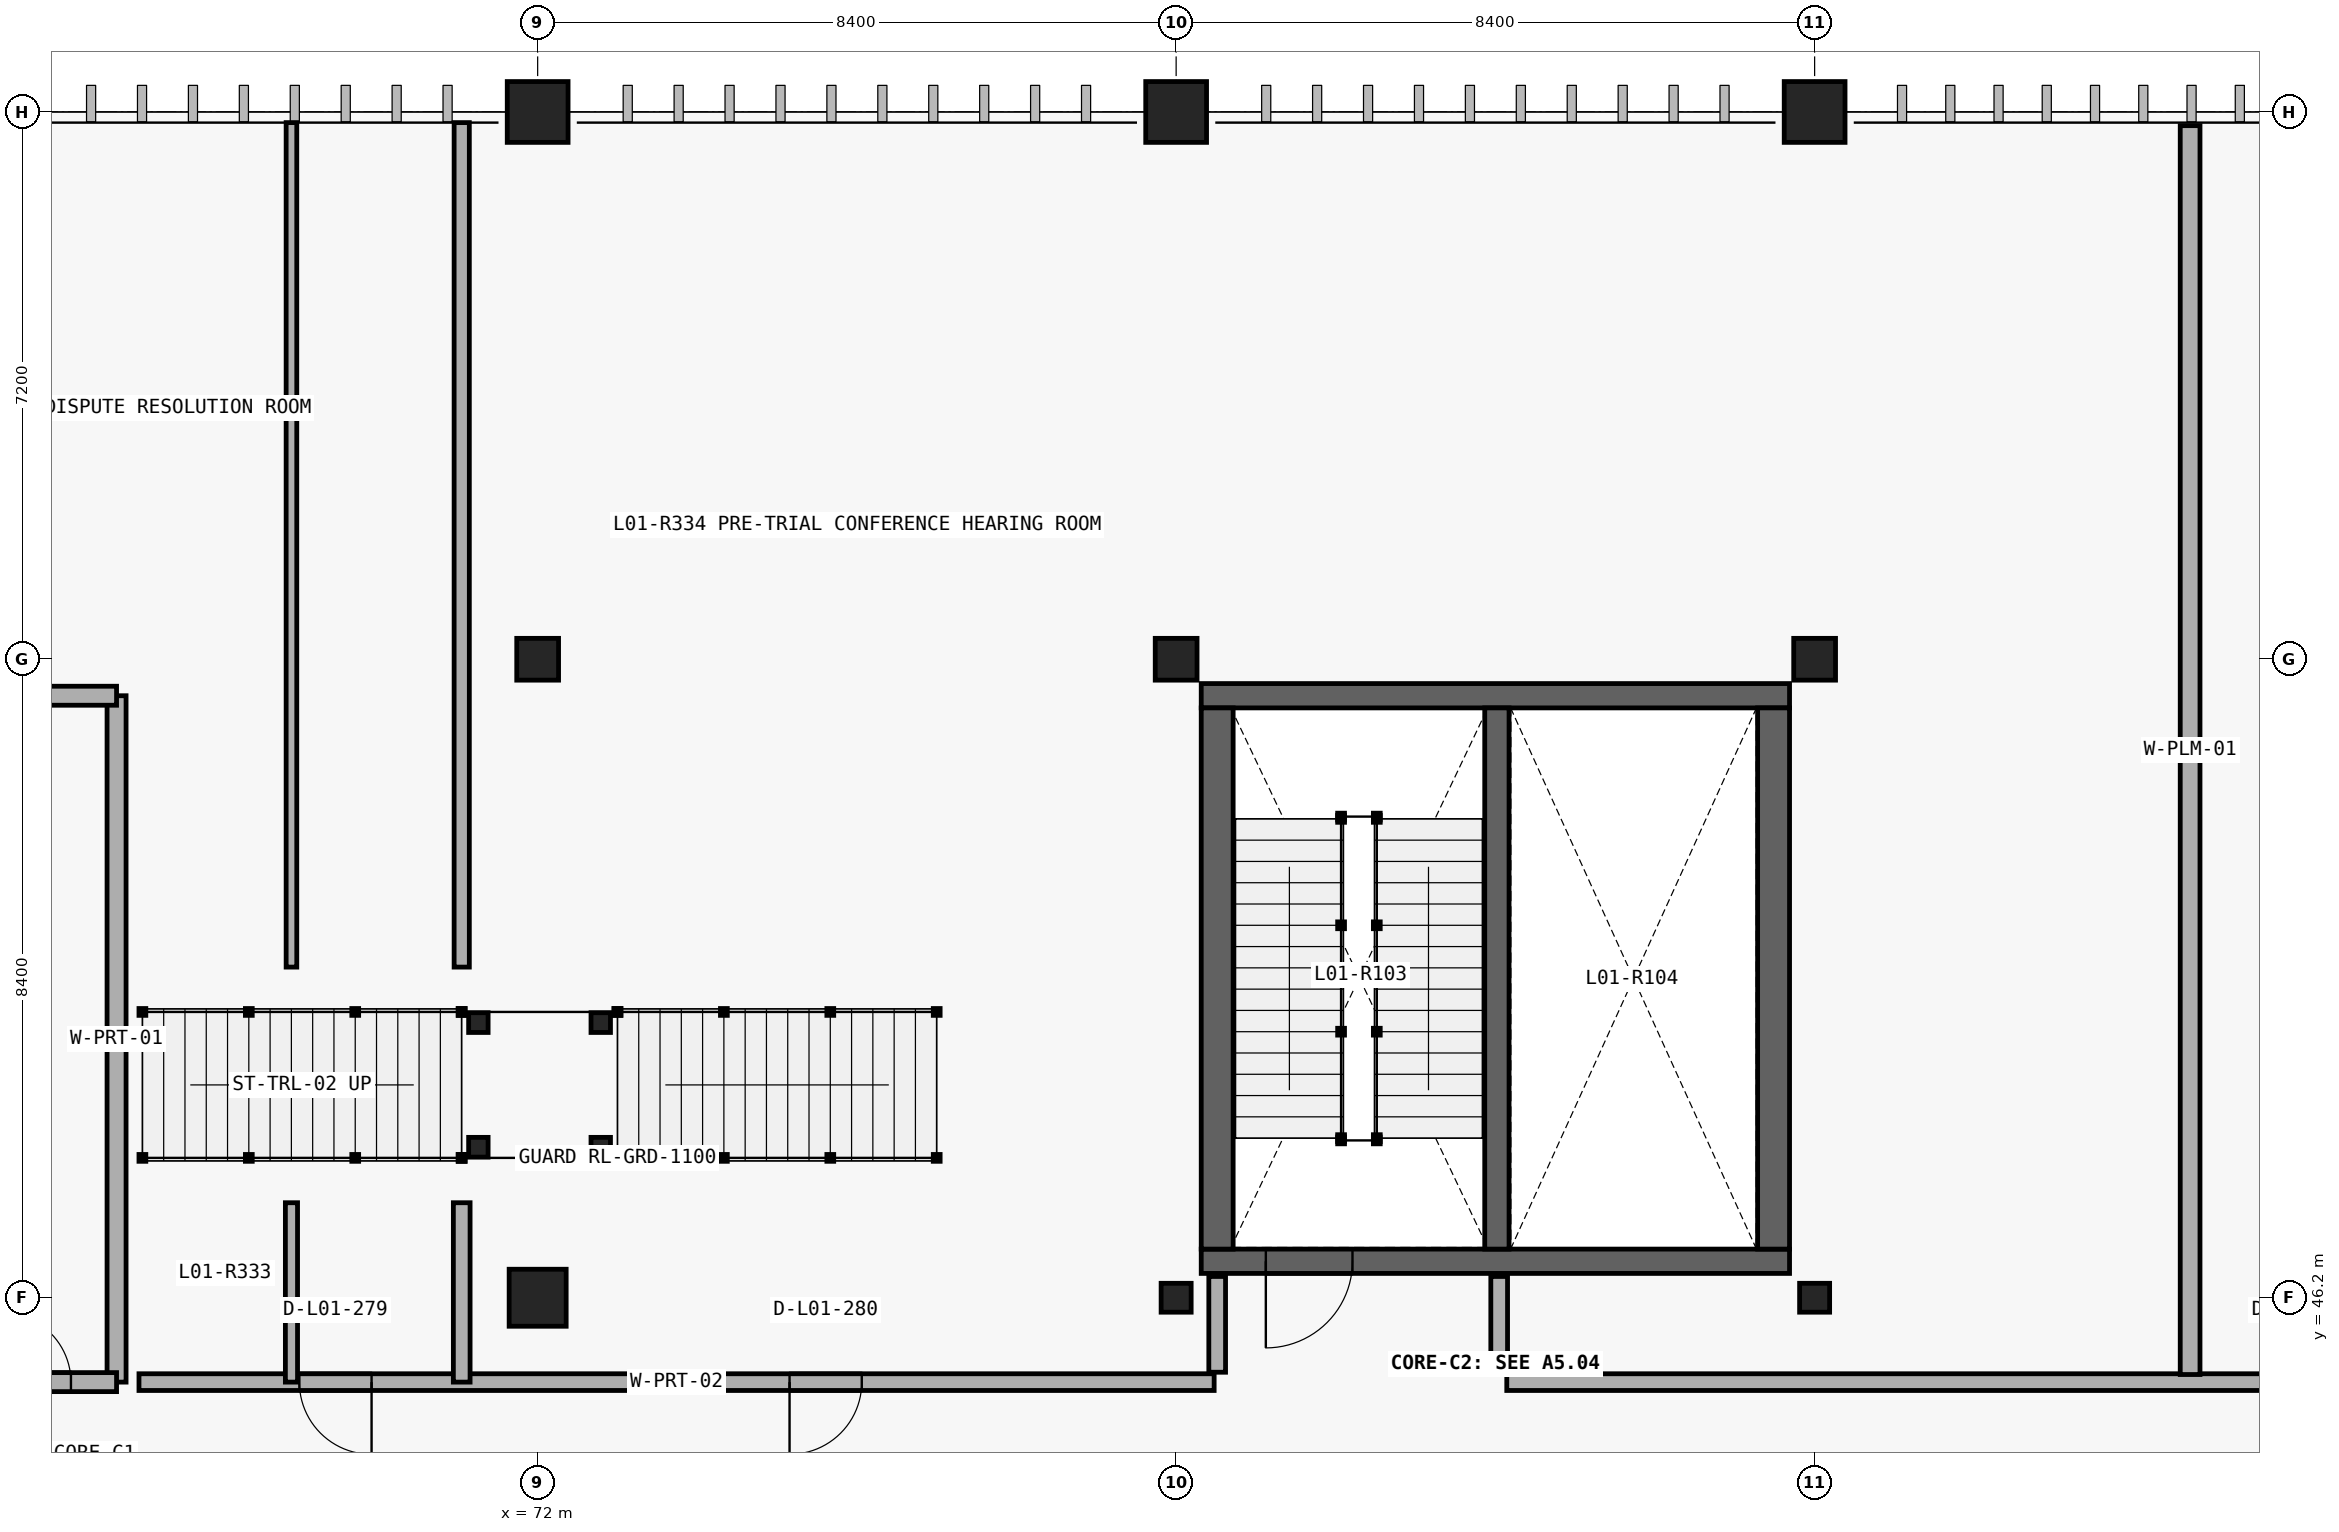
"""IFC4 building model, lengths in metres.
Left out: names, types, materials, properties, quantities, classifications, styles, units other than length and angle.
Written with IfcOpenShell. Run it as: python <this file> out.ifc"""

import sys

from ifc_helpers import new_model, si_unit, direction, frame, frame_2d, origin_with_axes, origin_2d_with_axis, place, context, subcontext, project, spatial, rectangle, circle, i_section, extrude, element, fill, save


model = new_model("IFC4")
c1 = context("Model", 3, precision=1e-05, world=origin_with_axes(), true_north=direction((0.0, 1.0)))
c2 = subcontext(c1, "Body", "Model", "MODEL_VIEW")
j1 = project(units=[si_unit("LENGTHUNIT", "METRE"), si_unit("PLANEANGLEUNIT", "RADIAN")], contexts=[c1])
p1 = place(None, origin_with_axes())
s1 = spatial("IfcSite", under=j1, at=p1, CompositionType="ELEMENT")
p2 = place(p1, origin_with_axes())
s2 = spatial("IfcBuilding", under=s1, at=p2, CompositionType="ELEMENT")
p3 = place(p2, frame((0.0, 0.0, 5.4), z_axis=(0.0, 0.0, 1.0), x_axis=(1.0, 0.0, 0.0)))
s3 = spatial("IfcBuildingStorey", under=s2, at=p3, CompositionType="ELEMENT", Elevation=5.4)
p4 = place(None, frame((66.46, 45.09, 5.4), z_axis=(0.0, 0.0, 1.0), x_axis=(0.0, 1.0, 0.0)))
e1 = element("IfcWall", 1, at=p4, inside=s3, PredefinedType="PARTITIONING", context=c2, shape_type="SweptSolid", body=[
    extrude(rectangle(XDim=9.03, YDim=0.25, at=frame_2d((4.515, 0.0), x_axis=(1.0, 0.0))), origin_with_axes(), (0.0, 0.0, 1.0), 5.08),
])
p5 = place(None, frame((63.1, 54.12, 5.4), z_axis=(0.0, 0.0, 1.0), x_axis=(1.0, 0.0, 0.0)))
e2 = element("IfcWall", 2, at=p5, inside=s3, PredefinedType="PARTITIONING", context=c2, shape_type="SweptSolid", body=[
    extrude(rectangle(XDim=3.36, YDim=0.25, at=frame_2d((1.68, 0.0), x_axis=(1.0, 0.0))), origin_with_axes(), (0.0, 0.0, 1.0), 5.08),
])
p6 = place(None, frame((63.1, 45.09, 5.4), z_axis=(0.0, 0.0, 1.0), x_axis=(1.0, 0.0, 0.0)))
e3 = element("IfcWall", 3, at=p6, inside=s3, PredefinedType="PARTITIONING", context=c2, shape_type="SweptSolid", body=[
    extrude(rectangle(XDim=3.36, YDim=0.25, at=frame_2d((1.68, 0.0), x_axis=(1.0, 0.0))), origin_with_axes(), (0.0, 0.0, 1.0), 5.08),
])
p7 = place(None, frame((65.405, 45.09, 5.4), z_axis=(0.0, 0.0, 1.0), x_axis=(1.0, 0.0, 0.0)))
e4 = element("IfcOpeningElement", 4, at=p7, cuts=e3, PredefinedType="OPENING", context=c2, shape_type="SweptSolid", body=[
    extrude(rectangle(XDim=0.91, YDim=2.12, at=frame_2d((0.0, 1.06), x_axis=(1.0, 0.0))), frame((0.0, 0.135, 0.0), z_axis=(0.0, -1.0, 0.0), x_axis=(1.0, 0.0, 0.0)), (0.0, 0.0, 1.0), 0.27),
])
p8 = place(None, frame((80.73, 46.68, 5.4), z_axis=(0.0, 0.0, 1.0), x_axis=(1.0, 0.0, 0.0)))
e5 = element("IfcWall", 5, at=p8, inside=s3, PredefinedType="SHEAR", context=c2, shape_type="SweptSolid", body=[
    extrude(rectangle(XDim=7.74, YDim=0.32, at=frame_2d((3.87, 0.0), x_axis=(1.0, 0.0))), origin_with_axes(), (0.0, 0.0, 1.0), 5.4),
])
p9 = place(None, frame((82.15, 46.68, 5.4), z_axis=(0.0, 0.0, 1.0), x_axis=(1.0, 0.0, 0.0)))
e6 = element("IfcOpeningElement", 6, at=p9, cuts=e5, PredefinedType="OPENING", context=c2, shape_type="SweptSolid", body=[
    extrude(rectangle(XDim=1.14, YDim=2.18, at=frame_2d((0.0, 1.09), x_axis=(1.0, 0.0))), frame((0.0, 0.17, 0.0), z_axis=(0.0, -1.0, 0.0), x_axis=(1.0, 0.0, 0.0)), (0.0, 0.0, 1.0), 0.34),
])
p10 = place(None, frame((88.47, 54.12, 5.4), z_axis=(0.0, 0.0, 1.0), x_axis=(-1.0, 0.0, 0.0)))
e7 = element("IfcWall", 7, at=p10, inside=s3, PredefinedType="SHEAR", context=c2, shape_type="SweptSolid", body=[
    extrude(rectangle(XDim=7.74, YDim=0.32, at=frame_2d((3.87, 0.0), x_axis=(1.0, 0.0))), origin_with_axes(), (0.0, 0.0, 1.0), 5.4),
])
for number, where, z_axis, x_axis in (
    (8, (88.26, 46.84, 5.4), (0.0, 0.0, 1.0), (0.0, 1.0, 0.0)),
    (9, (80.94, 53.96, 5.4), (0.0, 0.0, 1.0), (0.0, -1.0, 0.0)),
):
    element("IfcWall", number, at=place(None, frame(where, z_axis=z_axis, x_axis=x_axis)), inside=s3, PredefinedType="SHEAR", context=c2, shape_type="SweptSolid", body=[
        extrude(rectangle(XDim=7.12, YDim=0.42, at=frame_2d((3.56, 0.0), x_axis=(1.0, 0.0))), origin_with_axes(), (0.0, 0.0, 1.0), 5.4),
    ])
p11 = place(None, frame((84.62, 46.84, 5.4), z_axis=(0.0, 0.0, 1.0), x_axis=(0.0, 1.0, 0.0)))
e10 = element("IfcWall", 10, at=p11, inside=s3, PredefinedType="SHEAR", context=c2, shape_type="SweptSolid", body=[
    extrude(rectangle(XDim=7.12, YDim=0.32, at=frame_2d((3.56, 0.0), x_axis=(1.0, 0.0))), origin_with_axes(), (0.0, 0.0, 1.0), 5.4),
])
for number, where, z_axis, x_axis in (
    (11, (80.94, 45.22, 5.4), (0.0, 0.0, 1.0), (0.0, 1.0, 0.0)),
    (12, (84.65, 45.22, 5.4), (0.0, 0.0, 1.0), (0.0, 1.0, 0.0)),
):
    element("IfcWall", number, at=place(None, frame(where, z_axis=z_axis, x_axis=x_axis)), inside=s3, PredefinedType="PARTITIONING", context=c2, shape_type="SweptSolid", body=[
        extrude(rectangle(XDim=1.26, YDim=0.22, at=frame_2d((0.63, 0.0), x_axis=(1.0, 0.0))), origin_with_axes(), (0.0, 0.0, 1.0), 5.08),
    ])
p12 = place(None, frame((66.755, 45.09, 5.4), z_axis=(0.0, 0.0, 1.0), x_axis=(1.0, 0.0, 0.0)))
e13 = element("IfcWall", 13, at=p12, inside=s3, PredefinedType="PARTITIONING", context=c2, shape_type="SweptSolid", body=[
    extrude(rectangle(XDim=14.145, YDim=0.22, at=frame_2d((7.072, 0.0), x_axis=(1.0, 0.0))), origin_with_axes(), (0.0, 0.0, 1.0), 5.08),
])
p13 = place(None, frame((69.34, 45.09, 5.4), z_axis=(0.0, 0.0, 1.0), x_axis=(1.0, 0.0, 0.0)))
e14 = element("IfcOpeningElement", 14, at=p13, cuts=e13, PredefinedType="OPENING", context=c2, shape_type="SweptSolid", body=[
    extrude(rectangle(XDim=0.95, YDim=2.16, at=frame_2d((0.0, 1.08), x_axis=(1.0, 0.0))), frame((0.0, 0.12, 0.0), z_axis=(0.0, -1.0, 0.0), x_axis=(1.0, 0.0, 0.0)), (0.0, 0.0, 1.0), 0.24),
])
p14 = place(None, frame((75.789, 45.09, 5.4), z_axis=(0.0, 0.0, 1.0), x_axis=(1.0, 0.0, 0.0)))
e15 = element("IfcOpeningElement", 15, at=p14, cuts=e13, PredefinedType="OPENING", context=c2, shape_type="SweptSolid", body=[
    extrude(rectangle(XDim=0.95, YDim=2.16, at=frame_2d((0.0, 1.08), x_axis=(1.0, 0.0))), frame((0.0, 0.12, 0.0), z_axis=(0.0, -1.0, 0.0), x_axis=(1.0, 0.0, 0.0)), (0.0, 0.0, 1.0), 0.24),
])
p15 = place(None, frame((84.75, 45.09, 5.4), z_axis=(0.0, 0.0, 1.0), x_axis=(1.0, 0.0, 0.0)))
e16 = element("IfcWall", 16, at=p15, inside=s3, PredefinedType="PARTITIONING", context=c2, shape_type="SweptSolid", body=[
    extrude(rectangle(XDim=12.31, YDim=0.22, at=frame_2d((6.155, 0.0), x_axis=(1.0, 0.0))), origin_with_axes(), (0.0, 0.0, 1.0), 5.08),
])
p16 = place(None, frame((95.238, 45.09, 5.4), z_axis=(0.0, 0.0, 1.0), x_axis=(1.0, 0.0, 0.0)))
e17 = element("IfcOpeningElement", 17, at=p16, cuts=e16, PredefinedType="OPENING", context=c2, shape_type="SweptSolid", body=[
    extrude(rectangle(XDim=0.91, YDim=2.12, at=frame_2d((0.0, 1.06), x_axis=(1.0, 0.0))), frame((0.0, 0.12, 0.0), z_axis=(0.0, -1.0, 0.0), x_axis=(1.0, 0.0, 0.0)), (0.0, 0.0, 1.0), 0.24),
])
p17 = place(None, frame((93.74, 45.19, 5.4), z_axis=(0.0, 0.0, 1.0), x_axis=(0.0, 1.0, 0.0)))
e18 = element("IfcWall", 18, at=p17, inside=s3, PredefinedType="PLUMBINGWALL", context=c2, shape_type="SweptSolid", body=[
    extrude(rectangle(XDim=16.43, YDim=0.26, at=frame_2d((8.215, 0.0), x_axis=(1.0, 0.0))), origin_with_axes(), (0.0, 0.0, 1.0), 5.08),
])
p18 = place(None, frame((68.761, 45.09, 5.4), z_axis=(0.0, 0.0, 1.0), x_axis=(0.0, 1.0, 0.0)))
e19 = element("IfcWall", 19, at=p18, inside=s3, PredefinedType="PARTITIONING", context=c2, shape_type="SweptSolid", body=[
    extrude(rectangle(XDim=2.36, YDim=0.16, at=frame_2d((1.18, 0.0), x_axis=(1.0, 0.0))), origin_with_axes(), (0.0, 0.0, 1.0), 5.08),
])
p19 = place(None, frame((68.761, 50.55, 5.4), z_axis=(0.0, 0.0, 1.0), x_axis=(0.0, 1.0, 0.0)))
e20 = element("IfcWall", 20, at=p19, inside=s3, PredefinedType="PARTITIONING", context=c2, shape_type="SweptSolid", body=[
    extrude(rectangle(XDim=11.11, YDim=0.14, at=frame_2d((5.555, 0.0), x_axis=(1.0, 0.0))), origin_with_axes(), (0.0, 0.0, 1.0), 5.08),
])
p20 = place(None, frame((71.001, 45.09, 5.4), z_axis=(0.0, 0.0, 1.0), x_axis=(0.0, 1.0, 0.0)))
e21 = element("IfcWall", 21, at=p20, inside=s3, PredefinedType="PARTITIONING", context=c2, shape_type="SweptSolid", body=[
    extrude(rectangle(XDim=2.36, YDim=0.22, at=frame_2d((1.18, 0.0), x_axis=(1.0, 0.0))), origin_with_axes(), (0.0, 0.0, 1.0), 5.08),
])
p21 = place(None, frame((71.001, 50.55, 5.4), z_axis=(0.0, 0.0, 1.0), x_axis=(0.0, 1.0, 0.0)))
e22 = element("IfcWall", 22, at=p21, inside=s3, PredefinedType="PARTITIONING", context=c2, shape_type="SweptSolid", body=[
    extrude(rectangle(XDim=11.11, YDim=0.2, at=frame_2d((5.555, 0.0), x_axis=(1.0, 0.0))), origin_with_axes(), (0.0, 0.0, 1.0), 5.08),
])
p22 = place(None, frame((72.0, 46.2, 5.4), z_axis=(0.0, 0.0, 1.0), x_axis=(1.0, 0.0, 0.0)))
e23 = element("IfcColumn", 23, at=p22, inside=s3, PredefinedType="COLUMN", context=c2, shape_type="SweptSolid", body=[
    extrude(rectangle(XDim=0.75, YDim=0.75, at=origin_2d_with_axis()), origin_with_axes(), (0.0, 0.0, 1.0), 5.4),
])
p23 = place(None, frame((72.0, 54.6, 5.4), z_axis=(0.0, 0.0, 1.0), x_axis=(1.0, 0.0, 0.0)))
e24 = element("IfcColumn", 24, at=p23, inside=s3, PredefinedType="COLUMN", context=c2, shape_type="SweptSolid", body=[
    extrude(i_section(OverallWidth=0.55, OverallDepth=0.55, WebThickness=0.025, FlangeThickness=0.042, at=origin_2d_with_axis()), origin_with_axes(), (0.0, 0.0, 1.0), 5.4),
])
p24 = place(None, frame((72.0, 61.8, 5.4), z_axis=(0.0, 0.0, 1.0), x_axis=(1.0, 0.0, 0.0)))
e25 = element("IfcColumn", 25, at=p24, inside=s3, PredefinedType="COLUMN", context=c2, shape_type="SweptSolid", body=[
    extrude(circle(Radius=0.4, at=origin_2d_with_axis()), origin_with_axes(), (0.0, 0.0, 1.0), 5.4),
])
p25 = place(None, frame((80.4, 46.2, 5.4), z_axis=(0.0, 0.0, 1.0), x_axis=(1.0, 0.0, 0.0)))
e26 = element("IfcColumn", 26, at=p25, inside=s3, PredefinedType="COLUMN", context=c2, shape_type="SweptSolid", body=[
    extrude(i_section(OverallWidth=0.395, OverallDepth=0.38, WebThickness=0.019, FlangeThickness=0.03, at=origin_2d_with_axis()), origin_with_axes(), (0.0, 0.0, 1.0), 5.4),
])
p26 = place(None, frame((80.4, 54.6, 5.4), z_axis=(0.0, 0.0, 1.0), x_axis=(1.0, 0.0, 0.0)))
e27 = element("IfcColumn", 27, at=p26, inside=s3, PredefinedType="COLUMN", context=c2, shape_type="SweptSolid", body=[
    extrude(i_section(OverallWidth=0.55, OverallDepth=0.55, WebThickness=0.025, FlangeThickness=0.042, at=origin_2d_with_axis()), origin_with_axes(), (0.0, 0.0, 1.0), 5.4),
])
p27 = place(None, frame((80.4, 61.8, 5.4), z_axis=(0.0, 0.0, 1.0), x_axis=(1.0, 0.0, 0.0)))
e28 = element("IfcColumn", 28, at=p27, inside=s3, PredefinedType="COLUMN", context=c2, shape_type="SweptSolid", body=[
    extrude(circle(Radius=0.4, at=origin_2d_with_axis()), origin_with_axes(), (0.0, 0.0, 1.0), 5.4),
])
p28 = place(None, frame((88.8, 46.2, 5.4), z_axis=(0.0, 0.0, 1.0), x_axis=(1.0, 0.0, 0.0)))
e29 = element("IfcColumn", 29, at=p28, inside=s3, PredefinedType="COLUMN", context=c2, shape_type="SweptSolid", body=[
    extrude(i_section(OverallWidth=0.395, OverallDepth=0.38, WebThickness=0.019, FlangeThickness=0.03, at=origin_2d_with_axis()), origin_with_axes(), (0.0, 0.0, 1.0), 5.4),
])
p29 = place(None, frame((88.8, 54.6, 5.4), z_axis=(0.0, 0.0, 1.0), x_axis=(1.0, 0.0, 0.0)))
e30 = element("IfcColumn", 30, at=p29, inside=s3, PredefinedType="COLUMN", context=c2, shape_type="SweptSolid", body=[
    extrude(i_section(OverallWidth=0.55, OverallDepth=0.55, WebThickness=0.025, FlangeThickness=0.042, at=origin_2d_with_axis()), origin_with_axes(), (0.0, 0.0, 1.0), 5.4),
])
p30 = place(None, frame((88.8, 61.8, 5.4), z_axis=(0.0, 0.0, 1.0), x_axis=(1.0, 0.0, 0.0)))
e31 = element("IfcColumn", 31, at=p30, inside=s3, PredefinedType="COLUMN", context=c2, shape_type="SweptSolid", body=[
    extrude(circle(Radius=0.4, at=origin_2d_with_axis()), origin_with_axes(), (0.0, 0.0, 1.0), 5.4),
])
for number, where, z_axis, x_axis in (
    (32, (71.22, 48.18, 5.16), (0.0, 0.0, 1.0), (1.0, 0.0, 0.0)),
    (33, (71.22, 49.82, 5.16), (0.0, 0.0, 1.0), (1.0, 0.0, 0.0)),
    (34, (72.83, 48.18, 5.16), (0.0, 0.0, 1.0), (1.0, 0.0, 0.0)),
    (35, (72.83, 49.82, 5.16), (0.0, 0.0, 1.0), (1.0, 0.0, 0.0)),
):
    element("IfcColumn", number, at=place(None, frame(where, z_axis=z_axis, x_axis=x_axis)), inside=s3, PredefinedType="COLUMN", context=c2, shape_type="SweptSolid", body=[
        extrude(i_section(OverallWidth=0.256, OverallDepth=0.26, WebThickness=0.011, FlangeThickness=0.017, at=origin_2d_with_axis()), origin_with_axes(), (0.0, 0.0, 1.0), 2.76),
    ])
p31 = place(None, frame((65.405, 45.09, 5.4), z_axis=(0.0, 0.0, 1.0), x_axis=(1.0, 0.0, 0.0)))
e36 = element("IfcDoor", 36, at=p31, inside=s3, OperationType="SINGLE_SWING_LEFT", PredefinedType="DOOR", context=c2, shape_type="SweptSolid", body=[
    extrude(rectangle(XDim=0.91, YDim=2.12, at=frame_2d((0.0, 1.06), x_axis=(1.0, 0.0))), frame((0.0, 0.04, 0.0), z_axis=(0.0, -1.0, 0.0), x_axis=(1.0, 0.0, 0.0)), (0.0, 0.0, 1.0), 0.08),
])
fill(e4, e36)
p32 = place(None, frame((82.15, 46.68, 5.4), z_axis=(0.0, 0.0, 1.0), x_axis=(-1.0, 0.0, 0.0)))
e37 = element("IfcDoor", 37, at=p32, inside=s3, OperationType="SINGLE_SWING_LEFT", PredefinedType="DOOR", context=c2, shape_type="SweptSolid", body=[
    extrude(rectangle(XDim=1.14, YDim=2.18, at=frame_2d((0.0, 1.09), x_axis=(1.0, 0.0))), frame((0.0, 0.04, 0.0), z_axis=(0.0, -1.0, 0.0), x_axis=(1.0, 0.0, 0.0)), (0.0, 0.0, 1.0), 0.08),
])
fill(e6, e37)
p33 = place(None, frame((69.34, 45.09, 5.4), z_axis=(0.0, 0.0, 1.0), x_axis=(-1.0, 0.0, 0.0)))
e38 = element("IfcDoor", 38, at=p33, inside=s3, OperationType="SINGLE_SWING_RIGHT", PredefinedType="DOOR", context=c2, shape_type="SweptSolid", body=[
    extrude(rectangle(XDim=0.95, YDim=2.16, at=frame_2d((0.0, 1.08), x_axis=(1.0, 0.0))), frame((0.0, 0.04, 0.0), z_axis=(0.0, -1.0, 0.0), x_axis=(1.0, 0.0, 0.0)), (0.0, 0.0, 1.0), 0.08),
])
fill(e14, e38)
p34 = place(None, frame((75.789, 45.09, 5.4), z_axis=(0.0, 0.0, 1.0), x_axis=(-1.0, 0.0, 0.0)))
e39 = element("IfcDoor", 39, at=p34, inside=s3, OperationType="SINGLE_SWING_LEFT", PredefinedType="DOOR", context=c2, shape_type="SweptSolid", body=[
    extrude(rectangle(XDim=0.95, YDim=2.16, at=frame_2d((0.0, 1.08), x_axis=(1.0, 0.0))), frame((0.0, 0.04, 0.0), z_axis=(0.0, -1.0, 0.0), x_axis=(1.0, 0.0, 0.0)), (0.0, 0.0, 1.0), 0.08),
])
fill(e15, e39)
save(model, sys.argv[1])
